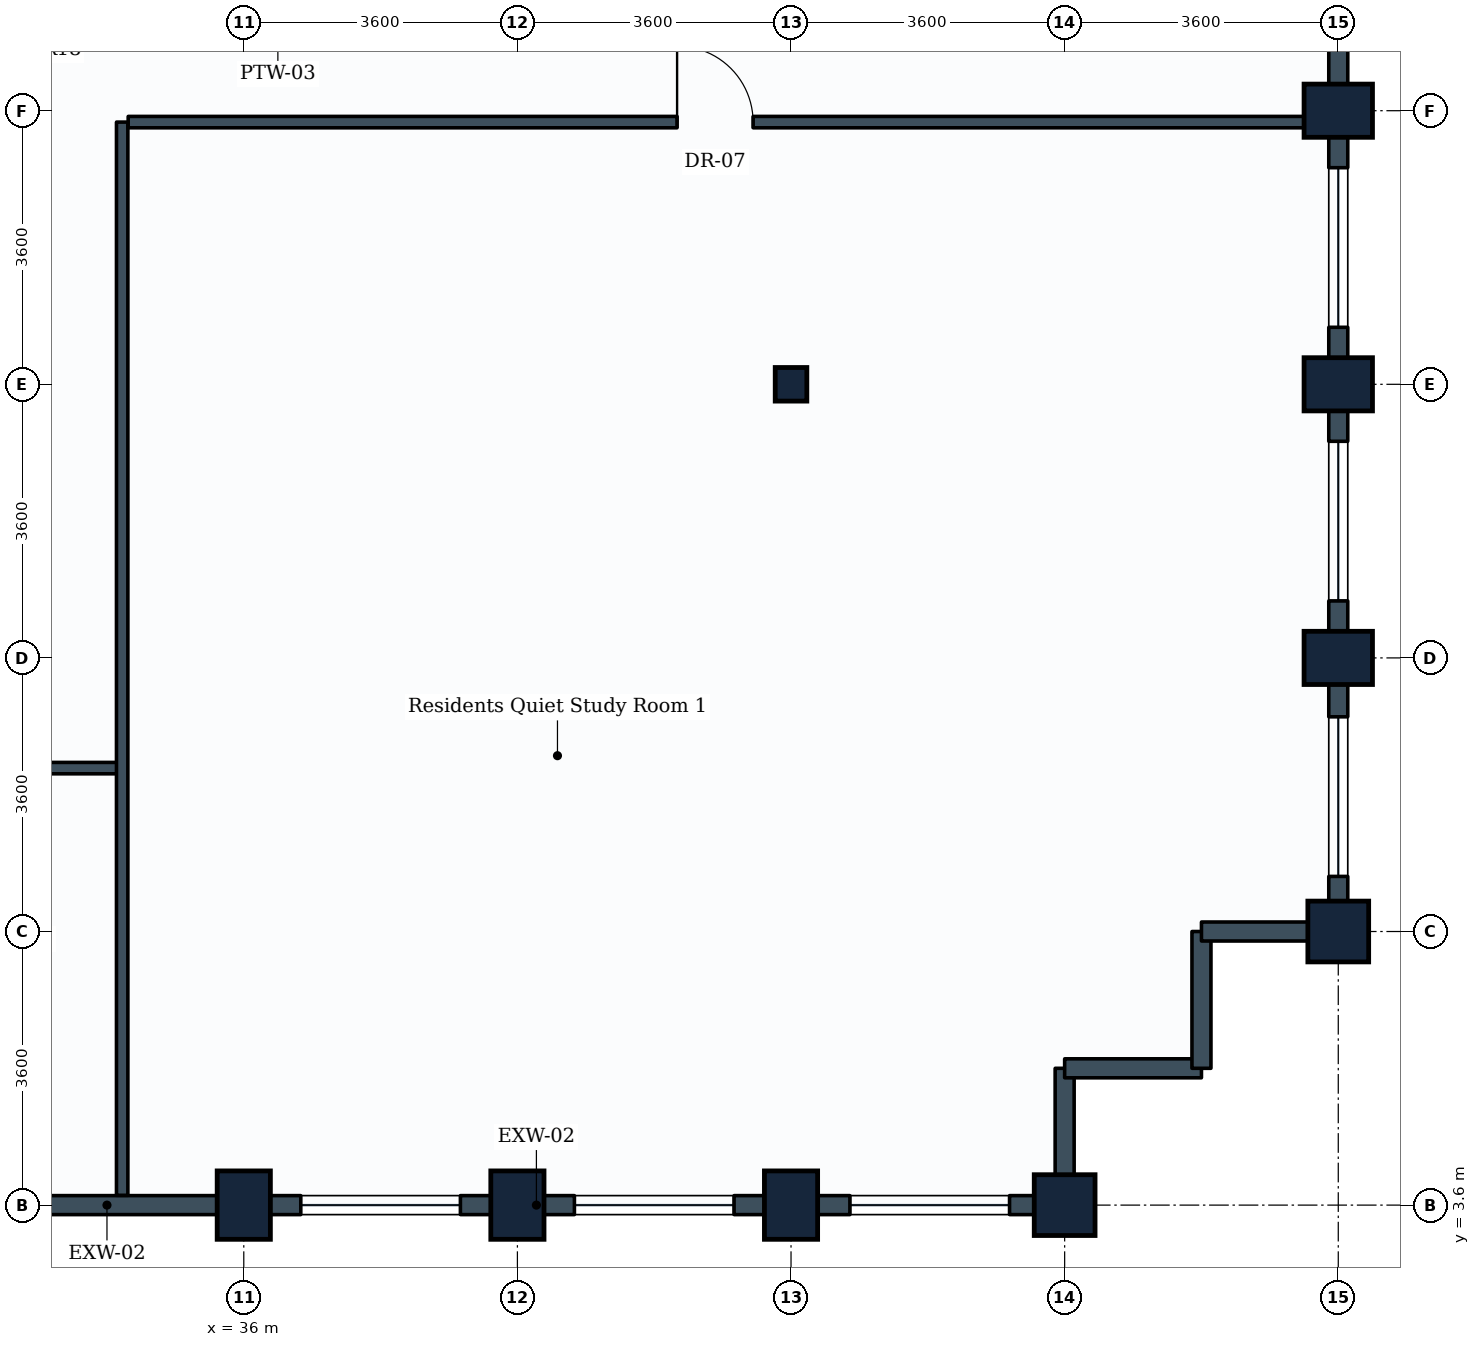
"""IFC4 building model, lengths in metres.
Left out: names, types, materials, properties, quantities, classifications, styles, units other than length and angle.
Written with IfcOpenShell. Run it as: python <this file> out.ifc"""

import sys

from ifc_helpers import new_model, si_unit, direction, frame, frame_2d, origin, origin_2d, place, context, subcontext, project, spatial, rectangle, i_section, extrude, element, fill, save


model = new_model("IFC4")
c1 = context("Model", 3, precision=1e-05, world=origin(), true_north=direction((0.0, 1.0)))
c2 = subcontext(c1, "Body", "Model", "MODEL_VIEW")
j1 = project(units=[si_unit("LENGTHUNIT", "METRE"), si_unit("PLANEANGLEUNIT", "RADIAN")], contexts=[c1])
p1 = place(None, origin())
s1 = spatial("IfcSite", under=j1, at=p1, CompositionType="ELEMENT")
p2 = place(p1, origin())
s2 = spatial("IfcBuilding", under=s1, at=p2, CompositionType="ELEMENT")
p3 = place(p2, frame((0.0, 0.0, 193.8)))
s3 = spatial("IfcBuildingStorey", under=s2, at=p3, CompositionType="ELEMENT", Elevation=193.8)
for number, where, z_axis, x_axis in (
    (1, (36.0, 3.6, 0.0), (0.0, 0.0, 1.0), (1.0, 0.0, 0.0)),
    (2, (39.6, 3.6, 0.0), (0.0, 0.0, 1.0), (1.0, 0.0, 0.0)),
    (3, (43.2, 3.6, 0.0), (0.0, 0.0, 1.0), (1.0, 0.0, 0.0)),
):
    element("IfcColumn", number, at=place(p3, frame(where, z_axis=z_axis, x_axis=x_axis)), inside=s3, PredefinedType="COLUMN", context=c2, shape_type="SweptSolid", body=[
        extrude(rectangle(XDim=0.7, YDim=0.9, at=origin_2d()), origin(), (0.0, 0.0, 1.0), 3.8),
    ])
p4 = place(p3, frame((43.2, 14.4, 0.0), z_axis=(0.0, 0.0, 1.0), x_axis=(1.0, 0.0, 0.0)))
e4 = element("IfcColumn", 4, at=p4, inside=s3, PredefinedType="COLUMN", context=c2, shape_type="SweptSolid", body=[
    extrude(i_section(OverallWidth=0.416, OverallDepth=0.442, WebThickness=0.025, FlangeThickness=0.041, FilletRadius=0.015, at=origin_2d()), origin(), (0.0, 0.0, 1.0), 3.8),
])
for number, where, z_axis, x_axis in (
    (5, (46.8, 3.6, 0.0), (0.0, 0.0, 1.0), (1.0, 0.0, 0.0)),
    (6, (50.4, 7.2, 0.0), (0.0, 0.0, 1.0), (1.0, 0.0, 0.0)),
):
    element("IfcColumn", number, at=place(p3, frame(where, z_axis=z_axis, x_axis=x_axis)), inside=s3, PredefinedType="COLUMN", context=c2, shape_type="SweptSolid", body=[
        extrude(rectangle(XDim=0.8, YDim=0.8, at=origin_2d()), origin(), (0.0, 0.0, 1.0), 3.8),
    ])
for number, where, z_axis, x_axis in (
    (7, (50.4, 10.8, 0.0), (0.0, 0.0, 1.0), (0.0, 1.0, 0.0)),
    (8, (50.4, 14.4, 0.0), (0.0, 0.0, 1.0), (0.0, 1.0, 0.0)),
    (9, (50.4, 18.0, 0.0), (0.0, 0.0, 1.0), (0.0, 1.0, 0.0)),
):
    element("IfcColumn", number, at=place(p3, frame(where, z_axis=z_axis, x_axis=x_axis)), inside=s3, PredefinedType="COLUMN", context=c2, shape_type="SweptSolid", body=[
        extrude(rectangle(XDim=0.7, YDim=0.9, at=origin_2d()), origin(), (0.0, 0.0, 1.0), 3.8),
    ])
p5 = place(p3, frame((36.0, 3.6, 0.0), z_axis=(0.0, 0.0, 1.0), x_axis=(-1.0, 0.0, 0.0)))
e10 = element("IfcWall", 10, at=p5, inside=s3, PredefinedType="STANDARD", context=c2, shape_type="SweptSolid", body=[
    extrude(rectangle(XDim=3.6, YDim=0.25, at=frame_2d((1.8, 0.0))), origin(), (0.0, 0.0, 1.0), 2.93),
])
p6 = place(p3, frame((39.6, 3.6, 0.0), z_axis=(0.0, 0.0, 1.0), x_axis=(-1.0, 0.0, 0.0)))
e11 = element("IfcWall", 11, at=p6, inside=s3, PredefinedType="STANDARD", context=c2, shape_type="SweptSolid", body=[
    extrude(rectangle(XDim=3.6, YDim=0.25, at=frame_2d((1.8, 0.0))), origin(), (0.0, 0.0, 1.0), 2.93),
])
p7 = place(p6, frame((0.75, 0.0, 0.85)))
e12 = element("IfcOpeningElement", 12, at=p7, cuts=e11, PredefinedType="OPENING", context=c2, shape_type="SweptSolid", body=[
    extrude(rectangle(XDim=2.1, YDim=1.35, at=frame_2d((1.05, 0.675))), frame((0.0, 0.135, 0.0), z_axis=(0.0, -1.0, 0.0), x_axis=(1.0, 0.0, 0.0)), (0.0, 0.0, 1.0), 0.27),
])
p8 = place(p3, frame((43.2, 3.6, 0.0), z_axis=(0.0, 0.0, 1.0), x_axis=(-1.0, 0.0, 0.0)))
e13 = element("IfcWall", 13, at=p8, inside=s3, PredefinedType="STANDARD", context=c2, shape_type="SweptSolid", body=[
    extrude(rectangle(XDim=3.6, YDim=0.25, at=frame_2d((1.8, 0.0))), origin(), (0.0, 0.0, 1.0), 2.93),
])
p9 = place(p8, frame((0.75, 0.0, 0.85)))
e14 = element("IfcOpeningElement", 14, at=p9, cuts=e13, PredefinedType="OPENING", context=c2, shape_type="SweptSolid", body=[
    extrude(rectangle(XDim=2.1, YDim=1.35, at=frame_2d((1.05, 0.675))), frame((0.0, 0.135, 0.0), z_axis=(0.0, -1.0, 0.0), x_axis=(1.0, 0.0, 0.0)), (0.0, 0.0, 1.0), 0.27),
])
p10 = place(p3, frame((46.8, 3.6, 0.0), z_axis=(0.0, 0.0, 1.0), x_axis=(-1.0, 0.0, 0.0)))
e15 = element("IfcWall", 15, at=p10, inside=s3, PredefinedType="STANDARD", context=c2, shape_type="SweptSolid", body=[
    extrude(rectangle(XDim=3.6, YDim=0.25, at=frame_2d((1.8, 0.0))), origin(), (0.0, 0.0, 1.0), 2.93),
])
p11 = place(p10, frame((0.725, 0.0, 0.85)))
e16 = element("IfcOpeningElement", 16, at=p11, cuts=e15, PredefinedType="OPENING", context=c2, shape_type="SweptSolid", body=[
    extrude(rectangle(XDim=2.1, YDim=1.35, at=frame_2d((1.05, 0.675))), frame((0.0, 0.135, 0.0), z_axis=(0.0, -1.0, 0.0), x_axis=(1.0, 0.0, 0.0)), (0.0, 0.0, 1.0), 0.27),
])
p12 = place(p3, frame((46.8, 5.4, 0.0), z_axis=(0.0, 0.0, 1.0), x_axis=(0.0, -1.0, 0.0)))
e17 = element("IfcWall", 17, at=p12, inside=s3, PredefinedType="STANDARD", context=c2, shape_type="SweptSolid", body=[
    extrude(rectangle(XDim=1.8, YDim=0.25, at=frame_2d((0.9, 0.0))), origin(), (0.0, 0.0, 1.0), 2.93),
])
for number, where, z_axis, x_axis in (
    (18, (48.6, 5.4, 0.0), (0.0, 0.0, 1.0), (-1.0, 0.0, 0.0)),
    (19, (48.6, 7.2, 0.0), (0.0, 0.0, 1.0), (0.0, -1.0, 0.0)),
):
    element("IfcWall", number, at=place(p3, frame(where, z_axis=z_axis, x_axis=x_axis)), inside=s3, PredefinedType="STANDARD", context=c2, shape_type="SweptSolid", body=[
        extrude(rectangle(XDim=1.8, YDim=0.25, at=frame_2d((0.9, 0.0))), origin(), (0.0, 0.0, 1.0), 3.535),
    ])
p13 = place(p3, frame((50.4, 7.2, 0.0), z_axis=(0.0, 0.0, 1.0), x_axis=(-1.0, 0.0, 0.0)))
e20 = element("IfcWall", 20, at=p13, inside=s3, PredefinedType="STANDARD", context=c2, shape_type="SweptSolid", body=[
    extrude(rectangle(XDim=1.8, YDim=0.25, at=frame_2d((0.9, 0.0))), origin(), (0.0, 0.0, 1.0), 2.93),
])
p14 = place(p3, frame((50.4, 10.8, 0.0), z_axis=(0.0, 0.0, 1.0), x_axis=(0.0, -1.0, 0.0)))
e21 = element("IfcWall", 21, at=p14, inside=s3, PredefinedType="STANDARD", context=c2, shape_type="SweptSolid", body=[
    extrude(rectangle(XDim=3.6, YDim=0.25, at=frame_2d((1.8, 0.0))), origin(), (0.0, 0.0, 1.0), 2.93),
])
p15 = place(p14, frame((0.775, 0.0, 0.85)))
e22 = element("IfcOpeningElement", 22, at=p15, cuts=e21, PredefinedType="OPENING", context=c2, shape_type="SweptSolid", body=[
    extrude(rectangle(XDim=2.1, YDim=1.35, at=frame_2d((1.05, 0.675))), frame((0.0, 0.135, 0.0), z_axis=(0.0, -1.0, 0.0), x_axis=(1.0, 0.0, 0.0)), (0.0, 0.0, 1.0), 0.27),
])
p16 = place(p3, frame((50.4, 14.4, 0.0), z_axis=(0.0, 0.0, 1.0), x_axis=(0.0, -1.0, 0.0)))
e23 = element("IfcWall", 23, at=p16, inside=s3, PredefinedType="STANDARD", context=c2, shape_type="SweptSolid", body=[
    extrude(rectangle(XDim=3.6, YDim=0.25, at=frame_2d((1.8, 0.0))), origin(), (0.0, 0.0, 1.0), 2.93),
])
p17 = place(p16, frame((0.75, 0.0, 0.85)))
e24 = element("IfcOpeningElement", 24, at=p17, cuts=e23, PredefinedType="OPENING", context=c2, shape_type="SweptSolid", body=[
    extrude(rectangle(XDim=2.1, YDim=1.35, at=frame_2d((1.05, 0.675))), frame((0.0, 0.135, 0.0), z_axis=(0.0, -1.0, 0.0), x_axis=(1.0, 0.0, 0.0)), (0.0, 0.0, 1.0), 0.27),
])
p18 = place(p3, frame((50.4, 18.0, 0.0), z_axis=(0.0, 0.0, 1.0), x_axis=(0.0, -1.0, 0.0)))
e25 = element("IfcWall", 25, at=p18, inside=s3, PredefinedType="STANDARD", context=c2, shape_type="SweptSolid", body=[
    extrude(rectangle(XDim=3.6, YDim=0.25, at=frame_2d((1.8, 0.0))), origin(), (0.0, 0.0, 1.0), 2.93),
])
p19 = place(p18, frame((0.75, 0.0, 0.85)))
e26 = element("IfcOpeningElement", 26, at=p19, cuts=e25, PredefinedType="OPENING", context=c2, shape_type="SweptSolid", body=[
    extrude(rectangle(XDim=2.1, YDim=1.35, at=frame_2d((1.05, 0.675))), frame((0.0, 0.135, 0.0), z_axis=(0.0, -1.0, 0.0), x_axis=(1.0, 0.0, 0.0)), (0.0, 0.0, 1.0), 0.27),
])
p20 = place(p3, frame((50.4, 21.6, 0.0), z_axis=(0.0, 0.0, 1.0), x_axis=(0.0, -1.0, 0.0)))
e27 = element("IfcWall", 27, at=p20, inside=s3, PredefinedType="STANDARD", context=c2, shape_type="SweptSolid", body=[
    extrude(rectangle(XDim=3.6, YDim=0.25, at=frame_2d((1.8, 0.0))), origin(), (0.0, 0.0, 1.0), 2.93),
])
p21 = place(p3, frame((28.879, 9.35, 0.0), z_axis=(0.0, 0.0, 1.0), x_axis=(1.0, 0.0, 0.0)))
e28 = element("IfcWall", 28, at=p21, inside=s3, PredefinedType="PARTITIONING", context=c2, shape_type="SweptSolid", body=[
    extrude(rectangle(XDim=5.521, YDim=0.15, at=frame_2d((2.76, 0.0))), origin(), (0.0, 0.0, 1.0), 3.535),
])
p22 = place(p21, frame((0.36, 0.0, 0.0)))
e29 = element("IfcOpeningElement", 29, at=p22, cuts=e28, PredefinedType="OPENING", context=c2, shape_type="SweptSolid", body=[
    extrude(rectangle(XDim=1.0, YDim=2.1, at=frame_2d((0.5, 1.05))), frame((0.0, 0.085, 0.0), z_axis=(0.0, -1.0, 0.0), x_axis=(1.0, 0.0, 0.0)), (0.0, 0.0, 1.0), 0.17),
])
p23 = place(p3, frame((34.4, 3.729, 0.0), z_axis=(0.0, 0.0, 1.0), x_axis=(0.0, 1.0, 0.0)))
e30 = element("IfcWall", 30, at=p23, inside=s3, PredefinedType="PARTITIONING", context=c2, shape_type="SweptSolid", body=[
    extrude(rectangle(XDim=14.121, YDim=0.15, at=frame_2d((7.061, 0.0))), origin(), (0.0, 0.0, 1.0), 2.93),
])
p24 = place(p3, frame((34.479, 17.85, 0.0), z_axis=(0.0, 0.0, 1.0), x_axis=(1.0, 0.0, 0.0)))
e31 = element("IfcWall", 31, at=p24, inside=s3, PredefinedType="PARTITIONING", context=c2, shape_type="SweptSolid", body=[
    extrude(rectangle(XDim=15.792, YDim=0.15, at=frame_2d((7.896, 0.0))), origin(), (0.0, 0.0, 1.0), 2.93),
])
p25 = place(p24, frame((7.222, 0.0, 0.0)))
e32 = element("IfcOpeningElement", 32, at=p25, cuts=e31, PredefinedType="OPENING", context=c2, shape_type="SweptSolid", body=[
    extrude(rectangle(XDim=1.0, YDim=2.1, at=frame_2d((0.5, 1.05))), frame((0.0, 0.085, 0.0), z_axis=(0.0, -1.0, 0.0), x_axis=(1.0, 0.0, 0.0)), (0.0, 0.0, 1.0), 0.17),
])
p26 = place(p7, origin())
e33 = element("IfcWindow", 33, at=p26, inside=s3, PartitioningType="SINGLE_PANEL", PredefinedType="WINDOW", context=c2, shape_type="SweptSolid", body=[
    extrude(rectangle(XDim=2.1, YDim=1.35, at=frame_2d((1.05, 0.675))), frame((0.0, 0.03, 0.0), z_axis=(0.0, -1.0, 0.0), x_axis=(1.0, 0.0, 0.0)), (0.0, 0.0, 1.0), 0.06),
])
fill(e12, e33)
p27 = place(p9, origin())
e34 = element("IfcWindow", 34, at=p27, inside=s3, PartitioningType="SINGLE_PANEL", PredefinedType="WINDOW", context=c2, shape_type="SweptSolid", body=[
    extrude(rectangle(XDim=2.1, YDim=1.35, at=frame_2d((1.05, 0.675))), frame((0.0, 0.03, 0.0), z_axis=(0.0, -1.0, 0.0), x_axis=(1.0, 0.0, 0.0)), (0.0, 0.0, 1.0), 0.06),
])
fill(e14, e34)
p28 = place(p11, origin())
e35 = element("IfcWindow", 35, at=p28, inside=s3, PartitioningType="SINGLE_PANEL", PredefinedType="WINDOW", context=c2, shape_type="SweptSolid", body=[
    extrude(rectangle(XDim=2.1, YDim=1.35, at=frame_2d((1.05, 0.675))), frame((0.0, 0.03, 0.0), z_axis=(0.0, -1.0, 0.0), x_axis=(1.0, 0.0, 0.0)), (0.0, 0.0, 1.0), 0.06),
])
fill(e16, e35)
p29 = place(p15, origin())
e36 = element("IfcWindow", 36, at=p29, inside=s3, PartitioningType="SINGLE_PANEL", PredefinedType="WINDOW", context=c2, shape_type="SweptSolid", body=[
    extrude(rectangle(XDim=2.1, YDim=1.35, at=frame_2d((1.05, 0.675))), frame((0.0, 0.03, 0.0), z_axis=(0.0, -1.0, 0.0), x_axis=(1.0, 0.0, 0.0)), (0.0, 0.0, 1.0), 0.06),
])
fill(e22, e36)
p30 = place(p17, origin())
e37 = element("IfcWindow", 37, at=p30, inside=s3, PartitioningType="SINGLE_PANEL", PredefinedType="WINDOW", context=c2, shape_type="SweptSolid", body=[
    extrude(rectangle(XDim=2.1, YDim=1.35, at=frame_2d((1.05, 0.675))), frame((0.0, 0.03, 0.0), z_axis=(0.0, -1.0, 0.0), x_axis=(1.0, 0.0, 0.0)), (0.0, 0.0, 1.0), 0.06),
])
fill(e24, e37)
p31 = place(p19, origin())
e38 = element("IfcWindow", 38, at=p31, inside=s3, PartitioningType="SINGLE_PANEL", PredefinedType="WINDOW", context=c2, shape_type="SweptSolid", body=[
    extrude(rectangle(XDim=2.1, YDim=1.35, at=frame_2d((1.05, 0.675))), frame((0.0, 0.03, 0.0), z_axis=(0.0, -1.0, 0.0), x_axis=(1.0, 0.0, 0.0)), (0.0, 0.0, 1.0), 0.06),
])
fill(e26, e38)
p32 = place(p25, origin())
e39 = element("IfcDoor", 39, at=p32, inside=s3, OperationType="SINGLE_SWING_LEFT", PredefinedType="DOOR", context=c2, shape_type="SweptSolid", body=[
    extrude(rectangle(XDim=1.0, YDim=2.1, at=frame_2d((0.5, 1.05))), frame((0.0, 0.025, 0.0), z_axis=(0.0, -1.0, 0.0), x_axis=(1.0, 0.0, 0.0)), (0.0, 0.0, 1.0), 0.05),
])
fill(e32, e39)
save(model, sys.argv[1])
